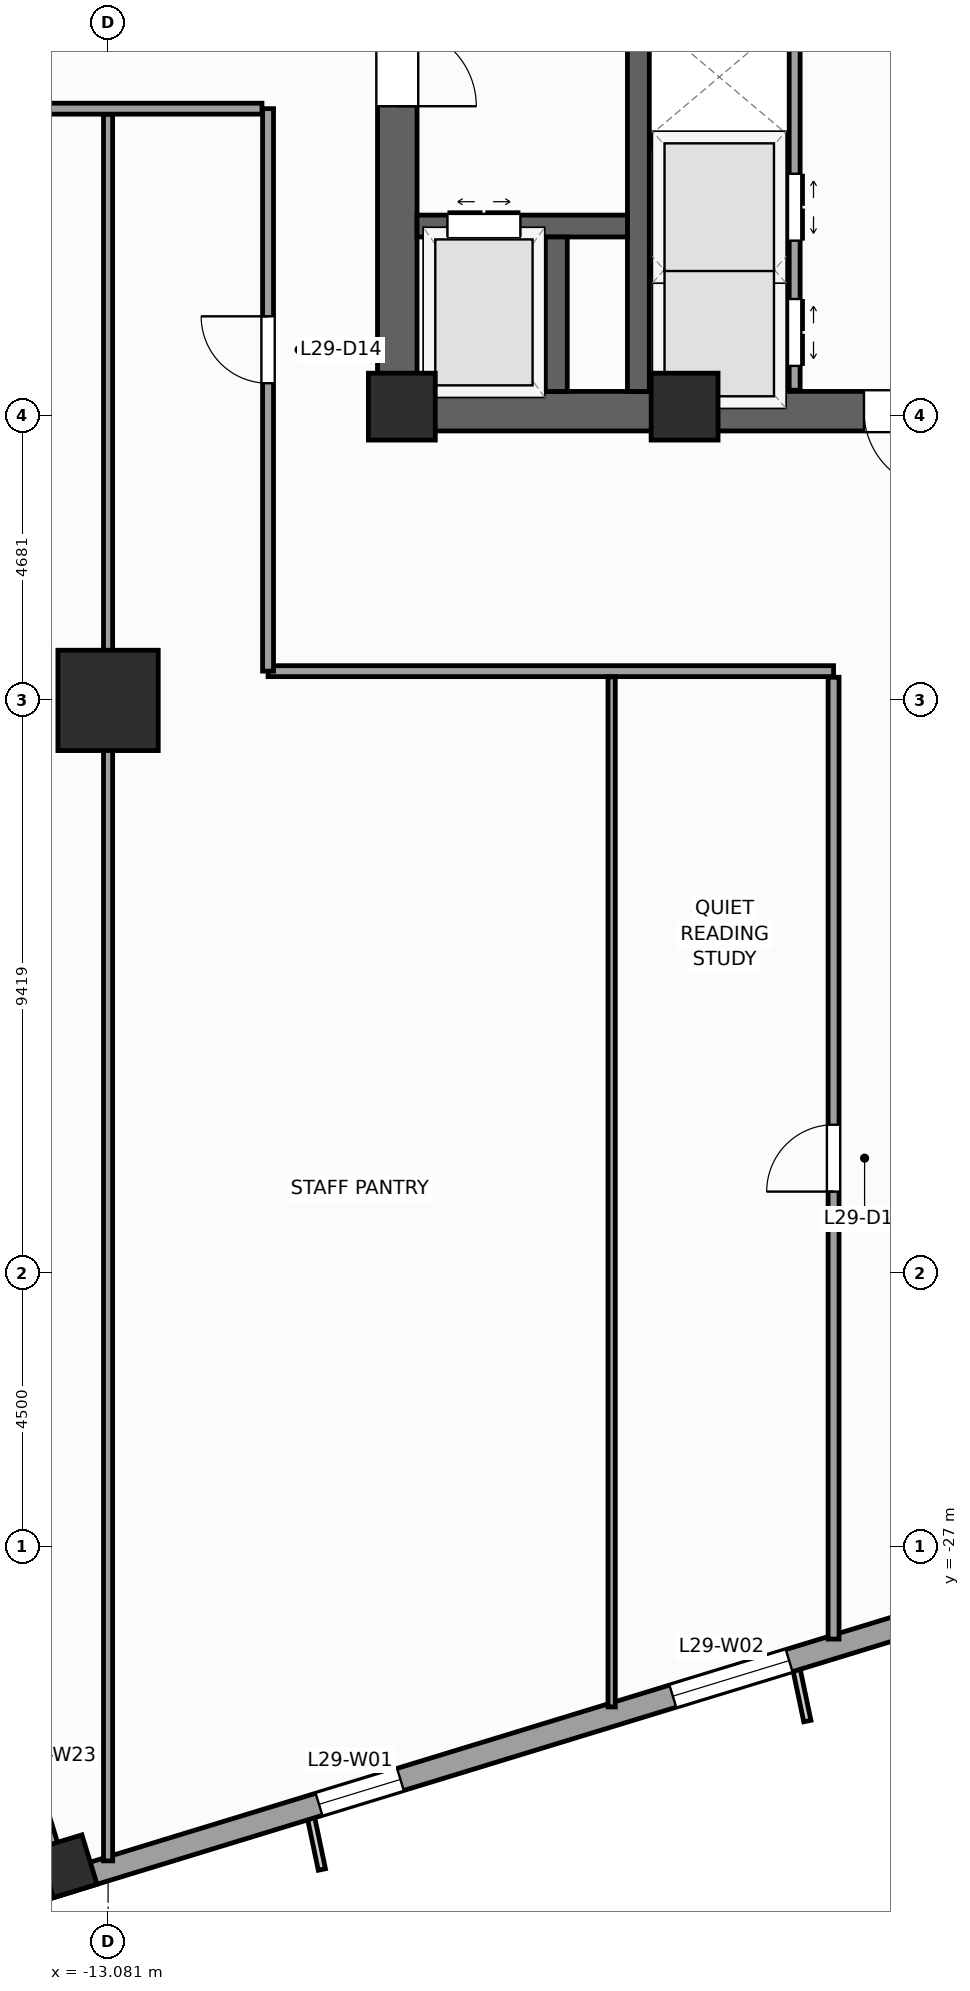
"""IFC4 building model, lengths in metres.
Left out: names, types, materials, properties, quantities, classifications, styles, units other than length and angle.
Written with IfcOpenShell. Run it as: python <this file> out.ifc"""

import sys

from ifc_helpers import new_model, si_unit, direction, frame, frame_2d, origin, origin_2d, place, context, subcontext, project, spatial, rectangle, extrude, source, transform, mapped, element, fill, save


model = new_model("IFC4")
c1 = context("Model", 3, precision=1e-05, world=origin(), true_north=direction((0.0, 1.0)))
c2 = subcontext(c1, "Body", "Model", "MODEL_VIEW")
j1 = project(units=[si_unit("LENGTHUNIT", "METRE"), si_unit("PLANEANGLEUNIT", "RADIAN")], contexts=[c1])
p1 = place(None, origin())
s1 = spatial("IfcSite", under=j1, at=p1, CompositionType="ELEMENT")
p2 = place(p1, origin())
s2 = spatial("IfcBuilding", under=s1, at=p2, CompositionType="ELEMENT")
p3 = place(p2, frame((0.0, 0.0, 123.2)))
s3 = spatial("IfcBuildingStorey", under=s2, at=p3, CompositionType="ELEMENT", Elevation=123.2)
p4 = place(p3, frame((-8.65, -8.325, 0.0), z_axis=(0.0, 0.0, 1.0), x_axis=(1.0, 0.0, 0.0)))
e1 = element("IfcWall", 1, at=p4, inside=s3, PredefinedType="SHEAR", context=c2, shape_type="SweptSolid", body=[
    extrude(rectangle(XDim=17.3, YDim=0.65, at=frame_2d((8.65, 0.0))), origin(), (0.0, 0.0, 1.0), 4.0),
])
p5 = place(p4, frame((8.0, 0.0, 0.0)))
e2 = element("IfcOpeningElement", 2, at=p5, cuts=e1, PredefinedType="OPENING", context=c2, shape_type="SweptSolid", body=[
    extrude(rectangle(XDim=1.3, YDim=2.2, at=frame_2d((0.65, 1.1))), frame((0.0, 0.335, 0.0), z_axis=(0.0, -1.0, 0.0), x_axis=(1.0, 0.0, 0.0)), (0.0, 0.0, 1.0), 0.67),
])
p6 = place(p3, frame((-8.325, -8.0, 0.0), z_axis=(0.0, 0.0, 1.0), x_axis=(0.0, 1.0, 0.0)))
e3 = element("IfcWall", 3, at=p6, inside=s3, PredefinedType="SHEAR", context=c2, shape_type="SweptSolid", body=[
    extrude(rectangle(XDim=16.0, YDim=0.65, at=frame_2d((8.0, 0.0))), origin(), (0.0, 0.0, 1.0), 4.0),
])
p7 = place(p6, frame((4.69, 0.0, 0.0)))
e4 = element("IfcOpeningElement", 4, at=p7, cuts=e3, PredefinedType="OPENING", context=c2, shape_type="SweptSolid", body=[
    extrude(rectangle(XDim=1.3, YDim=2.2, at=frame_2d((0.65, 1.1))), frame((0.0, 0.335, 0.0), z_axis=(0.0, -1.0, 0.0), x_axis=(1.0, 0.0, 0.0)), (0.0, 0.0, 1.0), 0.67),
])
p8 = place(p3, frame((-4.36, -8.0, 0.0), z_axis=(0.0, 0.0, 1.0), x_axis=(0.0, 1.0, 0.0)))
e5 = element("IfcWall", 5, at=p8, inside=s3, PredefinedType="SHEAR", context=c2, shape_type="SweptSolid", body=[
    extrude(rectangle(XDim=16.0, YDim=0.36, at=frame_2d((8.0, 0.0))), origin(), (0.0, 0.0, 1.0), 4.0),
])
p9 = place(p3, frame((-8.0, -5.28, 0.0), z_axis=(0.0, 0.0, 1.0), x_axis=(1.0, 0.0, 0.0)))
e6 = element("IfcWall", 6, at=p9, inside=s3, PredefinedType="SHEAR", context=c2, shape_type="SweptSolid", body=[
    extrude(rectangle(XDim=3.46, YDim=0.36, at=frame_2d((1.73, 0.0))), origin(), (0.0, 0.0, 1.0), 4.0),
])
p10 = place(p9, frame((0.5, 0.0, 0.0)))
e7 = element("IfcOpeningElement", 7, at=p10, cuts=e6, PredefinedType="OPENING", context=c2, shape_type="SweptSolid", body=[
    extrude(rectangle(XDim=1.2, YDim=2.25, at=frame_2d((0.6, 1.125))), frame((0.0, 0.19, 0.0), z_axis=(0.0, -1.0, 0.0), x_axis=(1.0, 0.0, 0.0)), (0.0, 0.0, 1.0), 0.38),
])
p11 = place(p3, frame((-5.71, -8.0, 0.0), z_axis=(0.0, 0.0, 1.0), x_axis=(0.0, 1.0, 0.0)))
e8 = element("IfcWall", 8, at=p11, inside=s3, PredefinedType="SHEAR", context=c2, shape_type="SweptSolid", body=[
    extrude(rectangle(XDim=2.54, YDim=0.36, at=frame_2d((1.27, 0.0))), origin(), (0.0, 0.0, 1.0), 4.0),
])
m1 = source(origin(), c2, "Body", "SweptSolid", [
    extrude(rectangle(XDim=1.1, YDim=1.1, at=origin_2d()), origin(), (0.0, 0.0, 1.0), 4.0),
])
for number, where, z_axis, x_axis in (
    (9, (-8.25, -8.25, 0.0), (0.0, 0.0, 1.0), (1.0, 0.0, 0.0)),
    (10, (-3.6, -8.25, 0.0), (0.0, 0.0, 1.0), (1.0, 0.0, 0.0)),
):
    element("IfcColumn", number, at=place(p3, frame(where, z_axis=z_axis, x_axis=x_axis)), inside=s3, PredefinedType="PILASTER", context=c2, shape_type="MappedRepresentation", body=[
        mapped(m1, transform((0.0, 0.0, 0.0), scale=1.0)),
    ])
m2 = source(origin(), c2, "Body", "SweptSolid", [
    extrude(rectangle(XDim=1.65, YDim=1.65, at=origin_2d()), origin(), (0.0, 0.0, 1.0), 4.0),
])
p12 = place(p3, frame((-13.081, -13.081, 0.0), z_axis=(0.0, 0.0, 1.0), x_axis=(1.0, 0.0, 0.0)))
e11 = element("IfcColumn", 11, at=p12, inside=s3, PredefinedType="COLUMN", context=c2, shape_type="MappedRepresentation", body=[
    mapped(m2, transform((0.0, 0.0, 0.0), scale=1.0)),
])
m3 = source(origin(), c2, "Body", "SweptSolid", [
    extrude(rectangle(XDim=0.75, YDim=0.85, at=origin_2d()), origin(), (0.0, 0.0, 1.0), 4.0),
])
p13 = place(p3, frame((-13.746, -32.253, 0.0), z_axis=(0.0, 0.0, 1.0), x_axis=(0.956304755963, 0.292371704723, 0.0)))
e12 = element("IfcColumn", 12, at=p13, inside=s3, PredefinedType="COLUMN", context=c2, shape_type="MappedRepresentation", body=[
    mapped(m3, transform((0.0, 0.0, 0.0), scale=1.0)),
])
p14 = place(p3, frame((-14.265, -32.658, 0.0), z_axis=(0.0, 0.0, 1.0), x_axis=(0.956304320851, 0.292373127906, 0.0)))
e13 = element("IfcWall", 13, at=p14, inside=s3, PredefinedType="STANDARD", context=c2, shape_type="SweptSolid", body=[
    extrude(rectangle(XDim=46.38, YDim=0.38, at=frame_2d((23.19, 0.0))), origin(), (0.0, 0.0, 1.0), 3.14),
])
p15 = place(p14, frame((28.265, 0.0, 0.0)))
e14 = element("IfcOpeningElement", 14, at=p15, cuts=e13, PredefinedType="OPENING", context=c2, shape_type="SweptSolid", body=[
    extrude(rectangle(XDim=1.05, YDim=2.25, at=frame_2d((0.525, 1.125))), frame((0.0, 0.2, 0.0), z_axis=(0.0, -1.0, 0.0), x_axis=(1.0, 0.0, 0.0)), (0.0, 0.0, 1.0), 0.4),
])
p16 = place(p14, frame((4.865, 0.0, 0.51)))
e15 = element("IfcOpeningElement", 15, at=p16, cuts=e13, PredefinedType="OPENING", context=c2, shape_type="SweptSolid", body=[
    extrude(rectangle(XDim=1.4, YDim=2.4, at=frame_2d((0.7, 1.2))), frame((0.0, 0.2, 0.0), z_axis=(0.0, -1.0, 0.0), x_axis=(1.0, 0.0, 0.0)), (0.0, 0.0, 1.0), 0.4),
])
p17 = place(p14, frame((10.95, 0.0, 0.51)))
e16 = element("IfcOpeningElement", 16, at=p17, cuts=e13, PredefinedType="OPENING", context=c2, shape_type="SweptSolid", body=[
    extrude(rectangle(XDim=2.0, YDim=2.4, at=frame_2d((1.0, 1.2))), frame((0.0, 0.2, 0.0), z_axis=(0.0, -1.0, 0.0), x_axis=(1.0, 0.0, 0.0)), (0.0, 0.0, 1.0), 0.4),
])
p18 = place(p14, frame((20.512, 0.0, 0.51)))
e17 = element("IfcOpeningElement", 17, at=p18, cuts=e13, PredefinedType="OPENING", context=c2, shape_type="SweptSolid", body=[
    extrude(rectangle(XDim=2.0, YDim=2.4, at=frame_2d((1.0, 1.2))), frame((0.0, 0.2, 0.0), z_axis=(0.0, -1.0, 0.0), x_axis=(1.0, 0.0, 0.0)), (0.0, 0.0, 1.0), 0.4),
])
p19 = place(p14, frame((30.538, 0.0, 0.51)))
e18 = element("IfcOpeningElement", 18, at=p19, cuts=e13, PredefinedType="OPENING", context=c2, shape_type="SweptSolid", body=[
    extrude(rectangle(XDim=2.0, YDim=2.4, at=frame_2d((1.0, 1.2))), frame((0.0, 0.2, 0.0), z_axis=(0.0, -1.0, 0.0), x_axis=(1.0, 0.0, 0.0)), (0.0, 0.0, 1.0), 0.4),
])
p20 = place(p14, frame((39.187, 0.0, 0.51)))
e19 = element("IfcOpeningElement", 19, at=p20, cuts=e13, PredefinedType="OPENING", context=c2, shape_type="SweptSolid", body=[
    extrude(rectangle(XDim=1.4, YDim=2.4, at=frame_2d((0.7, 1.2))), frame((0.0, 0.2, 0.0), z_axis=(0.0, -1.0, 0.0), x_axis=(1.0, 0.0, 0.0)), (0.0, 0.0, 1.0), 0.4),
])
p21 = place(p3, frame((-15.144, -28.482, 0.0), z_axis=(0.0, 0.0, 1.0), x_axis=(0.292373601522, -0.956304176051, 0.0)))
e20 = element("IfcWall", 20, at=p21, inside=s3, PredefinedType="STANDARD", context=c2, shape_type="SweptSolid", body=[
    extrude(rectangle(XDim=4.44, YDim=0.38, at=frame_2d((2.22, 0.0))), origin(), (0.0, 0.0, 1.0), 3.04),
])
p22 = place(p21, frame((1.52, 0.0, 0.51)))
e21 = element("IfcOpeningElement", 21, at=p22, cuts=e20, PredefinedType="OPENING", context=c2, shape_type="SweptSolid", body=[
    extrude(rectangle(XDim=1.4, YDim=2.4, at=frame_2d((0.7, 1.2))), frame((0.0, 0.2, 0.0), z_axis=(0.0, -1.0, 0.0), x_axis=(1.0, 0.0, 0.0)), (0.0, 0.0, 1.0), 0.4),
])
p23 = place(p3, frame((-1.79, -7.98, 0.0), z_axis=(0.0, 0.0, 1.0), x_axis=(0.0, 1.0, 0.0)))
e22 = element("IfcWall", 22, at=p23, inside=s3, PredefinedType="PARTITIONING", context=c2, shape_type="SweptSolid", body=[
    extrude(rectangle(XDim=12.38, YDim=0.18, at=frame_2d((6.19, 0.0))), origin(), (0.0, 0.0, 1.0), 3.74),
])
p24 = place(p23, frame((0.4, 0.0, 0.0)))
e23 = element("IfcOpeningElement", 23, at=p24, cuts=e22, PredefinedType="OPENING", context=c2, shape_type="SweptSolid", body=[
    extrude(rectangle(XDim=1.1, YDim=2.2, at=frame_2d((0.55, 1.1))), frame((0.0, 0.1, 0.0), z_axis=(0.0, -1.0, 0.0), x_axis=(1.0, 0.0, 0.0)), (0.0, 0.0, 1.0), 0.2),
])
p25 = place(p23, frame((2.46, 0.0, 0.0)))
e24 = element("IfcOpeningElement", 24, at=p25, cuts=e22, PredefinedType="OPENING", context=c2, shape_type="SweptSolid", body=[
    extrude(rectangle(XDim=1.1, YDim=2.2, at=frame_2d((0.55, 1.1))), frame((0.0, 0.1, 0.0), z_axis=(0.0, -1.0, 0.0), x_axis=(1.0, 0.0, 0.0)), (0.0, 0.0, 1.0), 0.2),
])
p26 = place(p3, frame((-4.17, -3.9, 0.0), z_axis=(0.0, 0.0, 1.0), x_axis=(1.0, 0.0, 0.0)))
e25 = element("IfcWall", 25, at=p26, inside=s3, PredefinedType="PARTITIONING", context=c2, shape_type="SweptSolid", body=[
    extrude(rectangle(XDim=2.28, YDim=0.18, at=frame_2d((1.14, 0.0))), origin(), (0.0, 0.0, 1.0), 3.74),
])
p27 = place(p3, frame((-4.16, -6.0, 0.0), z_axis=(0.0, 0.0, 1.0), x_axis=(1.0, 0.0, 0.0)))
e26 = element("IfcWall", 26, at=p27, inside=s3, PredefinedType="PARTITIONING", context=c2, shape_type="SweptSolid", body=[
    extrude(rectangle(XDim=2.26, YDim=0.12, at=frame_2d((1.13, 0.0))), origin(), (0.0, 0.0, 1.0), 3.74),
])
p28 = place(p3, frame((-10.45, -12.6, 0.0), z_axis=(0.0, 0.0, 1.0), x_axis=(1.0, 0.0, 0.0)))
e27 = element("IfcWall", 27, at=p28, inside=s3, PredefinedType="PARTITIONING", context=c2, shape_type="SweptSolid", body=[
    extrude(rectangle(XDim=9.3, YDim=0.18, at=frame_2d((4.65, 0.0))), origin(), (0.0, 0.0, 1.0), 3.74),
])
p29 = place(p3, frame((-10.45, -12.6, 0.0), z_axis=(0.0, 0.0, 1.0), x_axis=(0.0, 1.0, 0.0)))
e28 = element("IfcWall", 28, at=p29, inside=s3, PredefinedType="PARTITIONING", context=c2, shape_type="SweptSolid", body=[
    extrude(rectangle(XDim=9.25, YDim=0.18, at=frame_2d((4.625, 0.0))), origin(), (0.0, 0.0, 1.0), 3.74),
])
p30 = place(p29, frame((4.735, 0.0, 0.0)))
e29 = element("IfcOpeningElement", 29, at=p30, cuts=e28, PredefinedType="OPENING", context=c2, shape_type="SweptSolid", body=[
    extrude(rectangle(XDim=1.1, YDim=2.2, at=frame_2d((0.55, 1.1))), frame((0.0, 0.1, 0.0), z_axis=(0.0, -1.0, 0.0), x_axis=(1.0, 0.0, 0.0)), (0.0, 0.0, 1.0), 0.2),
])
p31 = place(p3, frame((-27.142, -3.35, 0.0), z_axis=(0.0, 0.0, 1.0), x_axis=(1.0, 0.0, 0.0)))
e30 = element("IfcWall", 30, at=p31, inside=s3, PredefinedType="PARTITIONING", context=c2, shape_type="SweptSolid", body=[
    extrude(rectangle(XDim=16.592, YDim=0.18, at=frame_2d((8.296, 0.0))), origin(), (0.0, 0.0, 1.0), 3.74),
])
p32 = place(p31, frame((6.645, 0.0, 0.0)))
e31 = element("IfcOpeningElement", 31, at=p32, cuts=e30, PredefinedType="OPENING", context=c2, shape_type="SweptSolid", body=[
    extrude(rectangle(XDim=1.1, YDim=2.2, at=frame_2d((0.55, 1.1))), frame((0.0, 0.1, 0.0), z_axis=(0.0, -1.0, 0.0), x_axis=(1.0, 0.0, 0.0)), (0.0, 0.0, 1.0), 0.2),
])
p33 = place(p3, frame((-1.15, -28.517, 0.0), z_axis=(0.0, 0.0, 1.0), x_axis=(0.0, 1.0, 0.0)))
e32 = element("IfcWall", 32, at=p33, inside=s3, PredefinedType="PARTITIONING", context=c2, shape_type="SweptSolid", body=[
    extrude(rectangle(XDim=15.817, YDim=0.18, at=frame_2d((7.909, 0.0))), origin(), (0.0, 0.0, 1.0), 3.41),
])
p34 = place(p33, frame((7.359, 0.0, 0.0)))
e33 = element("IfcOpeningElement", 33, at=p34, cuts=e32, PredefinedType="OPENING", context=c2, shape_type="SweptSolid", body=[
    extrude(rectangle(XDim=1.1, YDim=2.2, at=frame_2d((0.55, 1.1))), frame((0.0, 0.1, 0.0), z_axis=(0.0, -1.0, 0.0), x_axis=(1.0, 0.0, 0.0)), (0.0, 0.0, 1.0), 0.2),
])
p35 = place(p3, frame((-13.081, -32.165, 0.0), z_axis=(0.0, 0.0, 1.0), x_axis=(0.0, 1.0, 0.0)))
e34 = element("IfcWall", 34, at=p35, inside=s3, PredefinedType="PARTITIONING", context=c2, shape_type="SweptSolid", body=[
    extrude(rectangle(XDim=28.72, YDim=0.15, at=frame_2d((14.36, 0.0))), origin(), (0.0, 0.0, 1.0), 2.732),
])
p36 = place(p3, frame((-4.8, -29.633, 0.0), z_axis=(0.0, 0.0, 1.0), x_axis=(0.0, 1.0, 0.0)))
e35 = element("IfcWall", 35, at=p36, inside=s3, PredefinedType="PARTITIONING", context=c2, shape_type="SweptSolid", body=[
    extrude(rectangle(XDim=16.938, YDim=0.12, at=frame_2d((8.469, 0.0))), origin(), (0.0, 0.0, 1.0), 3.74),
])
m4 = source(origin(), c2, "Body", "SweptSolid", [
    extrude(rectangle(XDim=1.4, YDim=2.4, at=frame_2d((0.7, 1.2))), frame((0.0, 0.03, 0.0), z_axis=(0.0, -1.0, 0.0), x_axis=(1.0, 0.0, 0.0)), (0.0, 0.0, 1.0), 0.06),
])
p37 = place(p16, origin())
e36 = element("IfcWindow", 36, at=p37, inside=s3, PartitioningType="SINGLE_PANEL", PredefinedType="WINDOW", context=c2, shape_type="MappedRepresentation", body=[
    mapped(m4, transform((0.0, 0.0, 0.0), scale=1.0)),
])
fill(e15, e36)
m5 = source(origin(), c2, "Body", "SweptSolid", [
    extrude(rectangle(XDim=2.0, YDim=2.4, at=frame_2d((1.0, 1.2))), frame((0.0, 0.03, 0.0), z_axis=(0.0, -1.0, 0.0), x_axis=(1.0, 0.0, 0.0)), (0.0, 0.0, 1.0), 0.06),
])
p38 = place(p17, origin())
e37 = element("IfcWindow", 37, at=p38, inside=s3, PartitioningType="SINGLE_PANEL", PredefinedType="WINDOW", context=c2, shape_type="MappedRepresentation", body=[
    mapped(m5, transform((0.0, 0.0, 0.0), scale=1.0)),
])
fill(e16, e37)
m6 = source(origin(), c2, "Body", "SweptSolid", [
    extrude(rectangle(XDim=1.3, YDim=2.2, at=frame_2d((0.65, 1.1))), frame((0.0, 0.025, 0.0), z_axis=(0.0, -1.0, 0.0), x_axis=(1.0, 0.0, 0.0)), (0.0, 0.0, 1.0), 0.05),
])
p39 = place(p7, frame((1.3, 0.0, 0.0), z_axis=(0.0, 0.0, 1.0), x_axis=(-1.0, 0.0, 0.0)))
e38 = element("IfcDoor", 38, at=p39, inside=s3, OperationType="SINGLE_SWING_LEFT", PredefinedType="DOOR", context=c2, shape_type="MappedRepresentation", body=[
    mapped(m6, transform((0.0, 0.0, 0.0), scale=1.0)),
])
fill(e4, e38)
p40 = place(p5, frame((1.3, 0.0, 0.0), z_axis=(0.0, 0.0, 1.0), x_axis=(-1.0, 0.0, 0.0)))
e39 = element("IfcDoor", 39, at=p40, inside=s3, OperationType="SINGLE_SWING_RIGHT", PredefinedType="DOOR", context=c2, shape_type="MappedRepresentation", body=[
    mapped(m6, transform((0.0, 0.0, 0.0), scale=1.0)),
])
fill(e2, e39)
m7 = source(origin(), c2, "Body", "SweptSolid", [
    extrude(rectangle(XDim=1.2, YDim=2.25, at=frame_2d((0.6, 1.125))), frame((0.0, 0.025, 0.0), z_axis=(0.0, -1.0, 0.0), x_axis=(1.0, 0.0, 0.0)), (0.0, 0.0, 1.0), 0.05),
])
p41 = place(p10, origin())
e40 = element("IfcDoor", 40, at=p41, inside=s3, OperationType="DOUBLE_DOOR_SLIDING", PredefinedType="DOOR", context=c2, shape_type="MappedRepresentation", body=[
    mapped(m7, transform((0.0, 0.0, 0.0), scale=1.0)),
])
fill(e7, e40)
m8 = source(origin(), c2, "Body", "SweptSolid", [
    extrude(rectangle(XDim=1.1, YDim=2.2, at=frame_2d((0.55, 1.1))), frame((0.0, 0.025, 0.0), z_axis=(0.0, -1.0, 0.0), x_axis=(1.0, 0.0, 0.0)), (0.0, 0.0, 1.0), 0.05),
])
p42 = place(p24, frame((1.1, 0.0, 0.0), z_axis=(0.0, 0.0, 1.0), x_axis=(-1.0, 0.0, 0.0)))
e41 = element("IfcDoor", 41, at=p42, inside=s3, OperationType="DOUBLE_DOOR_SLIDING", PredefinedType="DOOR", context=c2, shape_type="MappedRepresentation", body=[
    mapped(m8, transform((0.0, 0.0, 0.0), scale=1.0)),
])
fill(e23, e41)
p43 = place(p25, frame((1.1, 0.0, 0.0), z_axis=(0.0, 0.0, 1.0), x_axis=(-1.0, 0.0, 0.0)))
e42 = element("IfcDoor", 42, at=p43, inside=s3, OperationType="DOUBLE_DOOR_SLIDING", PredefinedType="DOOR", context=c2, shape_type="MappedRepresentation", body=[
    mapped(m8, transform((0.0, 0.0, 0.0), scale=1.0)),
])
fill(e24, e42)
p44 = place(p30, origin())
e43 = element("IfcDoor", 43, at=p44, inside=s3, OperationType="SINGLE_SWING_RIGHT", PredefinedType="DOOR", context=c2, shape_type="MappedRepresentation", body=[
    mapped(m8, transform((0.0, 0.0, 0.0), scale=1.0)),
])
fill(e29, e43)
p45 = place(p34, origin())
e44 = element("IfcDoor", 44, at=p45, inside=s3, OperationType="SINGLE_SWING_LEFT", PredefinedType="DOOR", context=c2, shape_type="MappedRepresentation", body=[
    mapped(m8, transform((0.0, 0.0, 0.0), scale=1.0)),
])
fill(e33, e44)
save(model, sys.argv[1])
